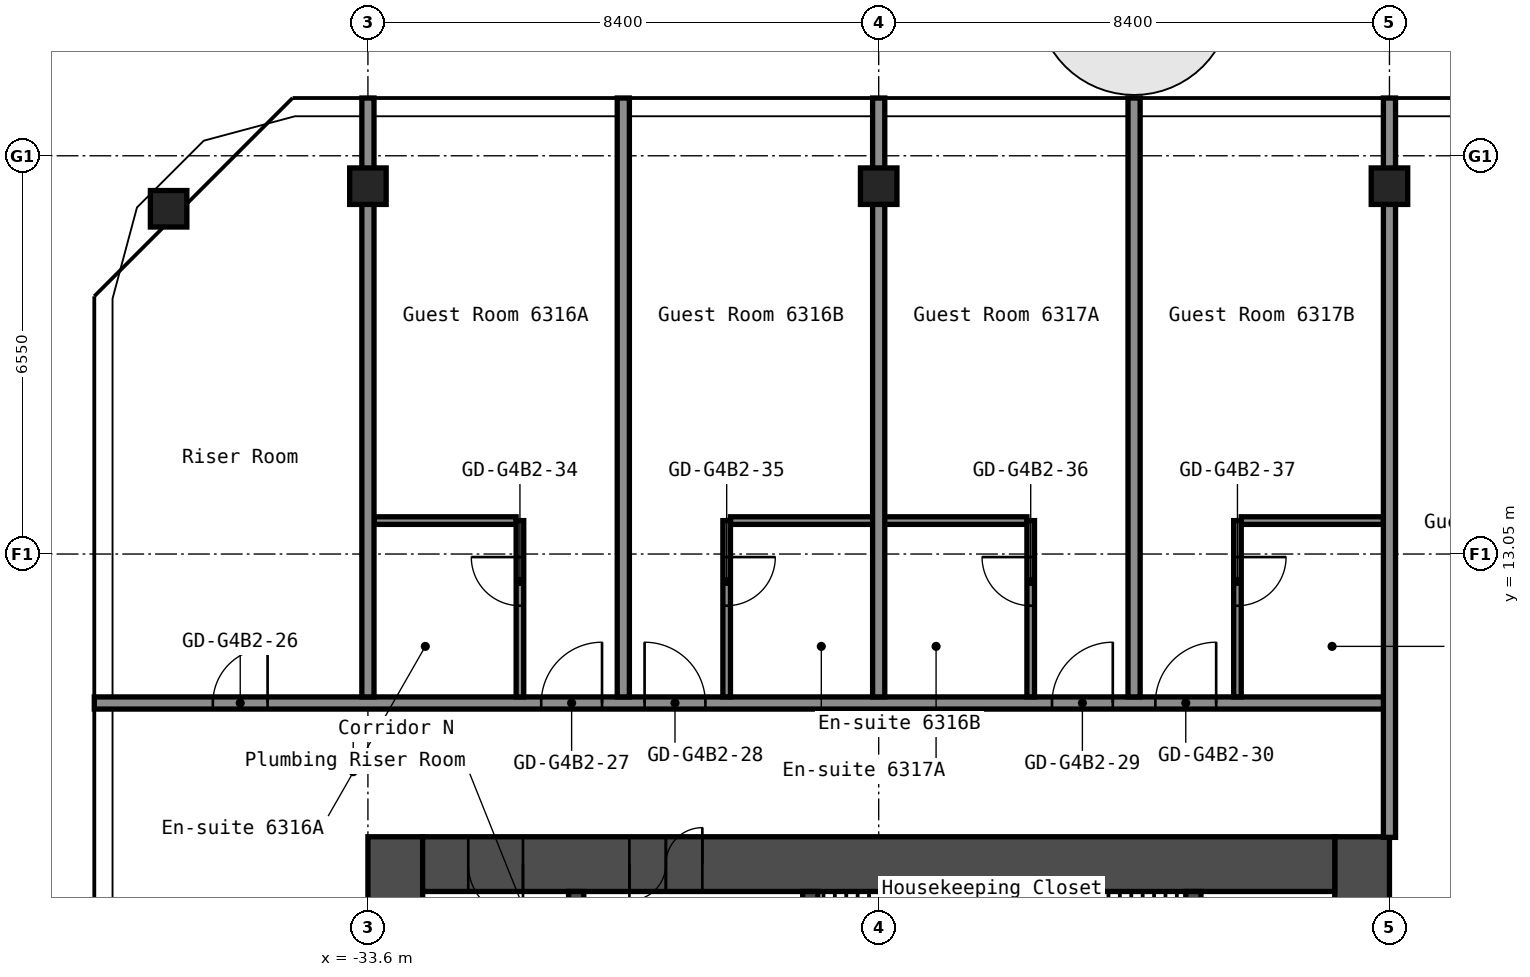
"""IFC4 building model, lengths in metres.
Left out: names, types, materials, properties, quantities, classifications, styles, units other than length and angle.
Written with IfcOpenShell. Run it as: python <this file> out.ifc"""

import sys

from ifc_helpers import new_model, si_unit, direction, frame, frame_2d, origin, origin_2d, place, context, subcontext, project, spatial, rectangle, hollow_rectangle, extrude, element, fill, save


model = new_model("IFC4")
c1 = context("Model", 3, precision=1e-05, world=origin(), true_north=direction((0.0, 1.0)))
c2 = subcontext(c1, "Body", "Model", "MODEL_VIEW")
j1 = project(units=[si_unit("LENGTHUNIT", "METRE"), si_unit("PLANEANGLEUNIT", "RADIAN")], contexts=[c1])
p1 = place(None, origin())
s1 = spatial("IfcSite", under=j1, at=p1, CompositionType="ELEMENT")
p2 = place(p1, origin())
s2 = spatial("IfcBuilding", under=s1, at=p2, CompositionType="ELEMENT")
p3 = place(p2, frame((0.0, 0.0, 221.8)))
s3 = spatial("IfcBuildingStorey", under=s2, at=p3, CompositionType="ELEMENT", Elevation=221.8)
for number, where, z_axis, x_axis in (
    (1, (-36.878, 18.729, 0.0), (0.0, 0.0, 1.0), (1.0, 0.0, 0.0)),
    (2, (-33.6, 19.1, 0.0), (0.0, 0.0, 1.0), (1.0, 0.0, 0.0)),
    (3, (-25.2, 19.1, 0.0), (0.0, 0.0, 1.0), (1.0, 0.0, 0.0)),
    (4, (-16.8, 19.1, 0.0), (0.0, 0.0, 1.0), (1.0, 0.0, 0.0)),
):
    element("IfcColumn", number, at=place(p3, frame(where, z_axis=z_axis, x_axis=x_axis)), inside=s3, PredefinedType="COLUMN", context=c2, shape_type="SweptSolid", body=[
        extrude(hollow_rectangle(XDim=0.6, YDim=0.6, WallThickness=0.025, InnerFilletRadius=0.038, OuterFilletRadius=0.062, at=origin_2d()), origin(), (0.0, 0.0, 1.0), 2.75),
    ])
p4 = place(p3, frame((-17.25, -8.4, 0.0), z_axis=(0.0, 0.0, 1.0), x_axis=(0.0, 1.0, 0.0)))
e5 = element("IfcWall", 5, at=p4, inside=s3, PredefinedType="SHEAR", context=c2, shape_type="SweptSolid", body=[
    extrude(rectangle(XDim=16.8, YDim=0.9, at=frame_2d((8.4, 0.0))), origin(), (0.0, 0.0, 1.0), 2.75),
])
p5 = place(p4, frame((10.1, 0.0, 0.0)))
e6 = element("IfcOpeningElement", 6, at=p5, cuts=e5, PredefinedType="OPENING", context=c2, shape_type="SweptSolid", body=[
    extrude(rectangle(XDim=1.6, YDim=2.1, at=frame_2d((0.8, 1.05))), frame((0.0, 0.46, 0.0), z_axis=(0.0, -1.0, 0.0), x_axis=(1.0, 0.0, 0.0)), (0.0, 0.0, 1.0), 0.92),
])
p6 = place(p3, frame((-33.15, -8.4, 0.0), z_axis=(0.0, 0.0, 1.0), x_axis=(0.0, 1.0, 0.0)))
e7 = element("IfcWall", 7, at=p6, inside=s3, PredefinedType="SHEAR", context=c2, shape_type="SweptSolid", body=[
    extrude(rectangle(XDim=16.8, YDim=0.9, at=frame_2d((8.4, 0.0))), origin(), (0.0, 0.0, 1.0), 2.75),
])
p7 = place(p3, frame((-32.7, 7.95, 0.0), z_axis=(0.0, 0.0, 1.0), x_axis=(1.0, 0.0, 0.0)))
e8 = element("IfcWall", 8, at=p7, inside=s3, PredefinedType="SHEAR", context=c2, shape_type="SweptSolid", body=[
    extrude(rectangle(XDim=15.0, YDim=0.9, at=frame_2d((7.5, 0.0))), origin(), (0.0, 0.0, 1.0), 2.75),
])
p8 = place(p7, frame((3.4, 0.0, 0.0)))
e9 = element("IfcOpeningElement", 9, at=p8, cuts=e8, PredefinedType="OPENING", context=c2, shape_type="SweptSolid", body=[
    extrude(rectangle(XDim=1.2, YDim=2.1, at=frame_2d((0.6, 1.05))), frame((0.0, 0.46, 0.0), z_axis=(0.0, -1.0, 0.0), x_axis=(1.0, 0.0, 0.0)), (0.0, 0.0, 1.0), 0.92),
])
p9 = place(p7, frame((0.75, 0.0, 0.0)))
e10 = element("IfcOpeningElement", 10, at=p9, cuts=e8, PredefinedType="OPENING", context=c2, shape_type="SweptSolid", body=[
    extrude(rectangle(XDim=0.9, YDim=2.1, at=frame_2d((0.45, 1.05))), frame((0.0, 0.46, 0.0), z_axis=(0.0, -1.0, 0.0), x_axis=(1.0, 0.0, 0.0)), (0.0, 0.0, 1.0), 0.92),
])
p10 = place(p3, frame((-20.025, 1.2, 0.0), z_axis=(0.0, 0.0, 1.0), x_axis=(0.0, 1.0, 0.0)))
e11 = element("IfcWall", 11, at=p10, inside=s3, PredefinedType="SHEAR", context=c2, shape_type="SweptSolid", body=[
    extrude(rectangle(XDim=6.3, YDim=0.25, at=frame_2d((3.15, 0.0))), origin(), (0.0, 0.0, 1.0), 2.75),
])
p11 = place(p3, frame((-26.325, 3.75, 0.0), z_axis=(0.0, 0.0, 1.0), x_axis=(0.0, 1.0, 0.0)))
e12 = element("IfcWall", 12, at=p11, inside=s3, PredefinedType="SHEAR", context=c2, shape_type="SweptSolid", body=[
    extrude(rectangle(XDim=3.75, YDim=0.25, at=frame_2d((1.875, 0.0))), origin(), (0.0, 0.0, 1.0), 2.75),
])
p12 = place(p11, frame((1.25, 0.0, 0.0)))
e13 = element("IfcOpeningElement", 13, at=p12, cuts=e12, PredefinedType="OPENING", context=c2, shape_type="SweptSolid", body=[
    extrude(rectangle(XDim=1.2, YDim=2.1, at=frame_2d((0.6, 1.05))), frame((0.0, 0.135, 0.0), z_axis=(0.0, -1.0, 0.0), x_axis=(1.0, 0.0, 0.0)), (0.0, 0.0, 1.0), 0.27),
])
p13 = place(p3, frame((-30.175, 1.45, 0.0), z_axis=(0.0, 0.0, 1.0), x_axis=(0.0, 1.0, 0.0)))
e14 = element("IfcWall", 14, at=p13, inside=s3, PredefinedType="SHEAR", context=c2, shape_type="SweptSolid", body=[
    extrude(rectangle(XDim=6.05, YDim=0.25, at=frame_2d((3.025, 0.0))), origin(), (0.0, 0.0, 1.0), 2.75),
])
p14 = place(p13, frame((2.625, 0.0, 0.0)))
e15 = element("IfcOpeningElement", 15, at=p14, cuts=e14, PredefinedType="OPENING", context=c2, shape_type="SweptSolid", body=[
    extrude(rectangle(XDim=1.1, YDim=2.1, at=frame_2d((0.55, 1.05))), frame((0.0, 0.135, 0.0), z_axis=(0.0, -1.0, 0.0), x_axis=(1.0, 0.0, 0.0)), (0.0, 0.0, 1.0), 0.27),
])
p15 = place(p3, frame((-38.1, 10.6, 0.0), z_axis=(0.0, 0.0, 1.0), x_axis=(1.0, 0.0, 0.0)))
e16 = element("IfcWall", 16, at=p15, inside=s3, PredefinedType="PARTITIONING", context=c2, shape_type="SweptSolid", body=[
    extrude(rectangle(XDim=21.3, YDim=0.2, at=frame_2d((10.65, 0.0))), origin(), (0.0, 0.0, 1.0), 2.75),
])
p16 = place(p15, frame((1.95, 0.0, 0.0)))
e17 = element("IfcOpeningElement", 17, at=p16, cuts=e16, PredefinedType="OPENING", context=c2, shape_type="SweptSolid", body=[
    extrude(rectangle(XDim=0.9, YDim=2.1, at=frame_2d((0.45, 1.05))), frame((0.0, 0.11, 0.0), z_axis=(0.0, -1.0, 0.0), x_axis=(1.0, 0.0, 0.0)), (0.0, 0.0, 1.0), 0.22),
])
p17 = place(p15, frame((7.35, 0.0, 0.0)))
e18 = element("IfcOpeningElement", 18, at=p17, cuts=e16, PredefinedType="OPENING", context=c2, shape_type="SweptSolid", body=[
    extrude(rectangle(XDim=1.0, YDim=2.1, at=frame_2d((0.5, 1.05))), frame((0.0, 0.11, 0.0), z_axis=(0.0, -1.0, 0.0), x_axis=(1.0, 0.0, 0.0)), (0.0, 0.0, 1.0), 0.22),
])
p18 = place(p15, frame((9.05, 0.0, 0.0)))
e19 = element("IfcOpeningElement", 19, at=p18, cuts=e16, PredefinedType="OPENING", context=c2, shape_type="SweptSolid", body=[
    extrude(rectangle(XDim=1.0, YDim=2.1, at=frame_2d((0.5, 1.05))), frame((0.0, 0.11, 0.0), z_axis=(0.0, -1.0, 0.0), x_axis=(1.0, 0.0, 0.0)), (0.0, 0.0, 1.0), 0.22),
])
p19 = place(p15, frame((15.75, 0.0, 0.0)))
e20 = element("IfcOpeningElement", 20, at=p19, cuts=e16, PredefinedType="OPENING", context=c2, shape_type="SweptSolid", body=[
    extrude(rectangle(XDim=1.0, YDim=2.1, at=frame_2d((0.5, 1.05))), frame((0.0, 0.11, 0.0), z_axis=(0.0, -1.0, 0.0), x_axis=(1.0, 0.0, 0.0)), (0.0, 0.0, 1.0), 0.22),
])
p20 = place(p15, frame((17.45, 0.0, 0.0)))
e21 = element("IfcOpeningElement", 21, at=p20, cuts=e16, PredefinedType="OPENING", context=c2, shape_type="SweptSolid", body=[
    extrude(rectangle(XDim=1.0, YDim=2.1, at=frame_2d((0.5, 1.05))), frame((0.0, 0.11, 0.0), z_axis=(0.0, -1.0, 0.0), x_axis=(1.0, 0.0, 0.0)), (0.0, 0.0, 1.0), 0.22),
])
p21 = place(p3, frame((-33.5, 13.6, 0.0), z_axis=(0.0, 0.0, 1.0), x_axis=(1.0, 0.0, 0.0)))
e22 = element("IfcWall", 22, at=p21, inside=s3, PredefinedType="PARTITIONING", context=c2, shape_type="SweptSolid", body=[
    extrude(rectangle(XDim=2.337, YDim=0.125, at=frame_2d((1.169, 0.0))), origin(), (0.0, 0.0, 1.0), 2.75),
])
p22 = place(p3, frame((-27.637, 13.6, 0.0), z_axis=(0.0, 0.0, 1.0), x_axis=(1.0, 0.0, 0.0)))
e23 = element("IfcWall", 23, at=p22, inside=s3, PredefinedType="PARTITIONING", context=c2, shape_type="SweptSolid", body=[
    extrude(rectangle(XDim=4.875, YDim=0.125, at=frame_2d((2.438, 0.0))), origin(), (0.0, 0.0, 1.0), 2.75),
])
p23 = place(p3, frame((-19.238, 13.6, 0.0), z_axis=(0.0, 0.0, 1.0), x_axis=(1.0, 0.0, 0.0)))
e24 = element("IfcWall", 24, at=p23, inside=s3, PredefinedType="PARTITIONING", context=c2, shape_type="SweptSolid", body=[
    extrude(rectangle(XDim=2.338, YDim=0.125, at=frame_2d((1.169, 0.0))), origin(), (0.0, 0.0, 1.0), 2.75),
])
p24 = place(p3, frame((-33.6, 10.7, 0.0), z_axis=(0.0, 0.0, 1.0), x_axis=(0.0, 1.0, 0.0)))
e25 = element("IfcWall", 25, at=p24, inside=s3, PredefinedType="PARTITIONING", context=c2, shape_type="SweptSolid", body=[
    extrude(rectangle(XDim=9.85, YDim=0.2, at=frame_2d((4.925, 0.0))), origin(), (0.0, 0.0, 1.0), 2.75),
])
p25 = place(p3, frame((-31.1, 10.7, 0.0), z_axis=(0.0, 0.0, 1.0), x_axis=(0.0, 1.0, 0.0)))
e26 = element("IfcWall", 26, at=p25, inside=s3, PredefinedType="PARTITIONING", context=c2, shape_type="SweptSolid", body=[
    extrude(rectangle(XDim=2.9, YDim=0.125, at=frame_2d((1.45, 0.0))), origin(), (0.0, 0.0, 1.0), 2.75),
])
p26 = place(p25, frame((1.5, 0.0, 0.0)))
e27 = element("IfcOpeningElement", 27, at=p26, cuts=e26, PredefinedType="OPENING", context=c2, shape_type="SweptSolid", body=[
    extrude(rectangle(XDim=0.8, YDim=2.1, at=frame_2d((0.4, 1.05))), frame((0.0, 0.073, 0.0), z_axis=(0.0, -1.0, 0.0), x_axis=(1.0, 0.0, 0.0)), (0.0, 0.0, 1.0), 0.145),
])
p27 = place(p3, frame((-29.4, 10.7, 0.0), z_axis=(0.0, 0.0, 1.0), x_axis=(0.0, 1.0, 0.0)))
e28 = element("IfcWall", 28, at=p27, inside=s3, PredefinedType="PARTITIONING", context=c2, shape_type="SweptSolid", body=[
    extrude(rectangle(XDim=9.85, YDim=0.2, at=frame_2d((4.925, 0.0))), origin(), (0.0, 0.0, 1.0), 2.75),
])
p28 = place(p3, frame((-27.7, 10.7, 0.0), z_axis=(0.0, 0.0, 1.0), x_axis=(0.0, 1.0, 0.0)))
e29 = element("IfcWall", 29, at=p28, inside=s3, PredefinedType="PARTITIONING", context=c2, shape_type="SweptSolid", body=[
    extrude(rectangle(XDim=2.9, YDim=0.125, at=frame_2d((1.45, 0.0))), origin(), (0.0, 0.0, 1.0), 2.75),
])
p29 = place(p28, frame((1.5, 0.0, 0.0)))
e30 = element("IfcOpeningElement", 30, at=p29, cuts=e29, PredefinedType="OPENING", context=c2, shape_type="SweptSolid", body=[
    extrude(rectangle(XDim=0.8, YDim=2.1, at=frame_2d((0.4, 1.05))), frame((0.0, 0.073, 0.0), z_axis=(0.0, -1.0, 0.0), x_axis=(1.0, 0.0, 0.0)), (0.0, 0.0, 1.0), 0.145),
])
p30 = place(p3, frame((-25.2, 10.7, 0.0), z_axis=(0.0, 0.0, 1.0), x_axis=(0.0, 1.0, 0.0)))
e31 = element("IfcWall", 31, at=p30, inside=s3, PredefinedType="PARTITIONING", context=c2, shape_type="SweptSolid", body=[
    extrude(rectangle(XDim=9.85, YDim=0.2, at=frame_2d((4.925, 0.0))), origin(), (0.0, 0.0, 1.0), 2.75),
])
p31 = place(p3, frame((-22.7, 10.7, 0.0), z_axis=(0.0, 0.0, 1.0), x_axis=(0.0, 1.0, 0.0)))
e32 = element("IfcWall", 32, at=p31, inside=s3, PredefinedType="PARTITIONING", context=c2, shape_type="SweptSolid", body=[
    extrude(rectangle(XDim=2.9, YDim=0.125, at=frame_2d((1.45, 0.0))), origin(), (0.0, 0.0, 1.0), 2.75),
])
p32 = place(p31, frame((1.5, 0.0, 0.0)))
e33 = element("IfcOpeningElement", 33, at=p32, cuts=e32, PredefinedType="OPENING", context=c2, shape_type="SweptSolid", body=[
    extrude(rectangle(XDim=0.8, YDim=2.1, at=frame_2d((0.4, 1.05))), frame((0.0, 0.073, 0.0), z_axis=(0.0, -1.0, 0.0), x_axis=(1.0, 0.0, 0.0)), (0.0, 0.0, 1.0), 0.145),
])
p33 = place(p3, frame((-21.0, 10.7, 0.0), z_axis=(0.0, 0.0, 1.0), x_axis=(0.0, 1.0, 0.0)))
e34 = element("IfcWall", 34, at=p33, inside=s3, PredefinedType="PARTITIONING", context=c2, shape_type="SweptSolid", body=[
    extrude(rectangle(XDim=9.85, YDim=0.2, at=frame_2d((4.925, 0.0))), origin(), (0.0, 0.0, 1.0), 2.75),
])
p34 = place(p3, frame((-19.3, 10.7, 0.0), z_axis=(0.0, 0.0, 1.0), x_axis=(0.0, 1.0, 0.0)))
e35 = element("IfcWall", 35, at=p34, inside=s3, PredefinedType="PARTITIONING", context=c2, shape_type="SweptSolid", body=[
    extrude(rectangle(XDim=2.9, YDim=0.125, at=frame_2d((1.45, 0.0))), origin(), (0.0, 0.0, 1.0), 2.75),
])
p35 = place(p34, frame((1.5, 0.0, 0.0)))
e36 = element("IfcOpeningElement", 36, at=p35, cuts=e35, PredefinedType="OPENING", context=c2, shape_type="SweptSolid", body=[
    extrude(rectangle(XDim=0.8, YDim=2.1, at=frame_2d((0.4, 1.05))), frame((0.0, 0.073, 0.0), z_axis=(0.0, -1.0, 0.0), x_axis=(1.0, 0.0, 0.0)), (0.0, 0.0, 1.0), 0.145),
])
p36 = place(p3, frame((-16.8, 8.39, 0.0), z_axis=(0.0, 0.0, 1.0), x_axis=(0.0, 1.0, 0.0)))
e37 = element("IfcWall", 37, at=p36, inside=s3, PredefinedType="PARTITIONING", context=c2, shape_type="SweptSolid", body=[
    extrude(rectangle(XDim=12.16, YDim=0.2, at=frame_2d((6.08, 0.0))), origin(), (0.0, 0.0, 1.0), 2.75),
])
p37 = place(p8, origin())
e38 = element("IfcDoor", 38, at=p37, inside=s3, OperationType="DOUBLE_DOOR_SINGLE_SWING", PredefinedType="DOOR", context=c2, shape_type="SweptSolid", body=[
    extrude(rectangle(XDim=1.2, YDim=2.1, at=frame_2d((0.6, 1.05))), frame((0.0, 0.025, 0.0), z_axis=(0.0, -1.0, 0.0), x_axis=(1.0, 0.0, 0.0)), (0.0, 0.0, 1.0), 0.05),
])
fill(e9, e38)
p38 = place(p9, origin())
e39 = element("IfcDoor", 39, at=p38, inside=s3, OperationType="SINGLE_SWING_RIGHT", PredefinedType="DOOR", context=c2, shape_type="SweptSolid", body=[
    extrude(rectangle(XDim=0.9, YDim=2.1, at=frame_2d((0.45, 1.05))), frame((0.0, 0.025, 0.0), z_axis=(0.0, -1.0, 0.0), x_axis=(1.0, 0.0, 0.0)), (0.0, 0.0, 1.0), 0.05),
])
fill(e10, e39)
p39 = place(p16, origin())
e40 = element("IfcDoor", 40, at=p39, inside=s3, OperationType="SINGLE_SWING_LEFT", PredefinedType="DOOR", context=c2, shape_type="SweptSolid", body=[
    extrude(rectangle(XDim=0.9, YDim=2.1, at=frame_2d((0.45, 1.05))), frame((0.0, 0.025, 0.0), z_axis=(0.0, -1.0, 0.0), x_axis=(1.0, 0.0, 0.0)), (0.0, 0.0, 1.0), 0.05),
])
fill(e17, e40)
p40 = place(p17, origin())
e41 = element("IfcDoor", 41, at=p40, inside=s3, OperationType="SINGLE_SWING_LEFT", PredefinedType="DOOR", context=c2, shape_type="SweptSolid", body=[
    extrude(rectangle(XDim=1.0, YDim=2.1, at=frame_2d((0.5, 1.05))), frame((0.0, 0.025, 0.0), z_axis=(0.0, -1.0, 0.0), x_axis=(1.0, 0.0, 0.0)), (0.0, 0.0, 1.0), 0.05),
])
fill(e18, e41)
p41 = place(p18, origin())
e42 = element("IfcDoor", 42, at=p41, inside=s3, OperationType="SINGLE_SWING_RIGHT", PredefinedType="DOOR", context=c2, shape_type="SweptSolid", body=[
    extrude(rectangle(XDim=1.0, YDim=2.1, at=frame_2d((0.5, 1.05))), frame((0.0, 0.025, 0.0), z_axis=(0.0, -1.0, 0.0), x_axis=(1.0, 0.0, 0.0)), (0.0, 0.0, 1.0), 0.05),
])
fill(e19, e42)
p42 = place(p19, origin())
e43 = element("IfcDoor", 43, at=p42, inside=s3, OperationType="SINGLE_SWING_LEFT", PredefinedType="DOOR", context=c2, shape_type="SweptSolid", body=[
    extrude(rectangle(XDim=1.0, YDim=2.1, at=frame_2d((0.5, 1.05))), frame((0.0, 0.025, 0.0), z_axis=(0.0, -1.0, 0.0), x_axis=(1.0, 0.0, 0.0)), (0.0, 0.0, 1.0), 0.05),
])
fill(e20, e43)
p43 = place(p20, origin())
e44 = element("IfcDoor", 44, at=p43, inside=s3, OperationType="SINGLE_SWING_LEFT", PredefinedType="DOOR", context=c2, shape_type="SweptSolid", body=[
    extrude(rectangle(XDim=1.0, YDim=2.1, at=frame_2d((0.5, 1.05))), frame((0.0, 0.025, 0.0), z_axis=(0.0, -1.0, 0.0), x_axis=(1.0, 0.0, 0.0)), (0.0, 0.0, 1.0), 0.05),
])
fill(e21, e44)
p44 = place(p26, origin())
e45 = element("IfcDoor", 45, at=p44, inside=s3, OperationType="SINGLE_SWING_LEFT", PredefinedType="DOOR", context=c2, shape_type="SweptSolid", body=[
    extrude(rectangle(XDim=0.8, YDim=2.1, at=frame_2d((0.4, 1.05))), frame((0.0, 0.025, 0.0), z_axis=(0.0, -1.0, 0.0), x_axis=(1.0, 0.0, 0.0)), (0.0, 0.0, 1.0), 0.05),
])
fill(e27, e45)
p45 = place(p29, origin())
e46 = element("IfcDoor", 46, at=p45, inside=s3, OperationType="SINGLE_SWING_RIGHT", PredefinedType="DOOR", context=c2, shape_type="SweptSolid", body=[
    extrude(rectangle(XDim=0.8, YDim=2.1, at=frame_2d((0.4, 1.05))), frame((0.0, 0.025, 0.0), z_axis=(0.0, -1.0, 0.0), x_axis=(1.0, 0.0, 0.0)), (0.0, 0.0, 1.0), 0.05),
])
fill(e30, e46)
p46 = place(p32, origin())
e47 = element("IfcDoor", 47, at=p46, inside=s3, OperationType="SINGLE_SWING_LEFT", PredefinedType="DOOR", context=c2, shape_type="SweptSolid", body=[
    extrude(rectangle(XDim=0.8, YDim=2.1, at=frame_2d((0.4, 1.05))), frame((0.0, 0.025, 0.0), z_axis=(0.0, -1.0, 0.0), x_axis=(1.0, 0.0, 0.0)), (0.0, 0.0, 1.0), 0.05),
])
fill(e33, e47)
p47 = place(p35, origin())
e48 = element("IfcDoor", 48, at=p47, inside=s3, OperationType="SINGLE_SWING_RIGHT", PredefinedType="DOOR", context=c2, shape_type="SweptSolid", body=[
    extrude(rectangle(XDim=0.8, YDim=2.1, at=frame_2d((0.4, 1.05))), frame((0.0, 0.025, 0.0), z_axis=(0.0, -1.0, 0.0), x_axis=(1.0, 0.0, 0.0)), (0.0, 0.0, 1.0), 0.05),
])
fill(e36, e48)
save(model, sys.argv[1])
